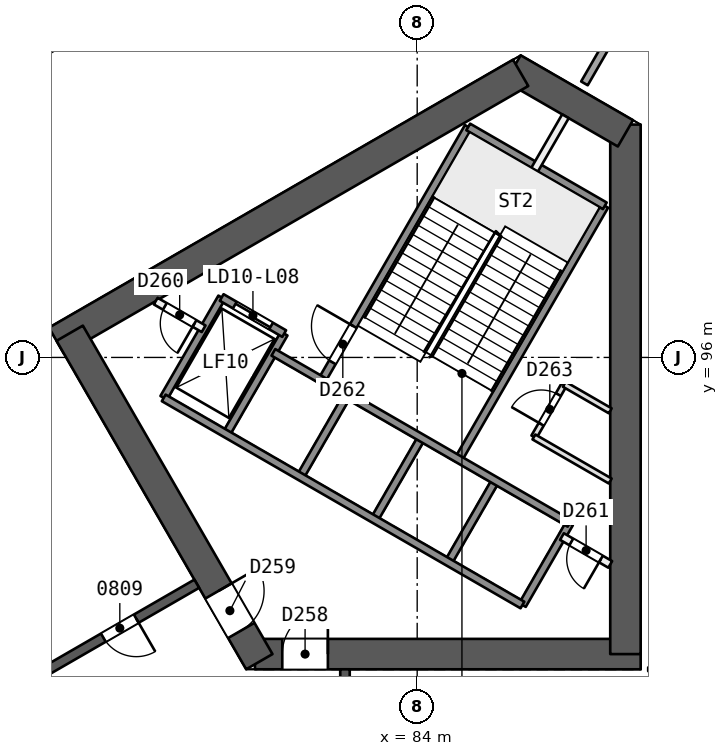
"""IFC4 building model, lengths in metres.
Left out: names, types, materials, properties, quantities, classifications, styles, units other than length and angle.
Written with IfcOpenShell. Run it as: python <this file> out.ifc"""

import sys

from ifc_helpers import new_model, si_unit, direction, frame, frame_2d, origin, place, context, subcontext, project, spatial, rectangle, extrude, element, fill, save


model = new_model("IFC4")
c1 = context("Model", 3, precision=1e-05, world=origin(), true_north=direction((0.0, 1.0)))
c2 = subcontext(c1, "Body", "Model", "MODEL_VIEW")
j1 = project(units=[si_unit("LENGTHUNIT", "METRE"), si_unit("PLANEANGLEUNIT", "RADIAN")], contexts=[c1])
p1 = place(None, origin())
s1 = spatial("IfcSite", under=j1, at=p1, CompositionType="ELEMENT")
p2 = place(p1, origin())
s2 = spatial("IfcBuilding", under=s1, at=p2, CompositionType="ELEMENT")
p3 = place(p2, frame((0.0, 0.0, 41.1)))
s3 = spatial("IfcBuildingStorey", under=s2, at=p3, CompositionType="ELEMENT", Elevation=41.1)
p4 = place(p3, frame((79.731, 88.194, 0.0), z_axis=(0.0, 0.0, 1.0), x_axis=(1.0, 0.0, 0.0)))
e1 = element("IfcWall", 1, at=p4, inside=s3, PredefinedType="SHEAR", context=c2, shape_type="SweptSolid", body=[
    extrude(rectangle(XDim=10.149, YDim=0.8, at=frame_2d((5.074, 0.0))), origin(), (0.0, 0.0, 1.0), 3.7),
])
p5 = place(p4, frame((0.719, 0.0, 0.0)))
e2 = element("IfcOpeningElement", 2, at=p5, cuts=e1, PredefinedType="OPENING", context=c2, shape_type="SweptSolid", body=[
    extrude(rectangle(XDim=1.2, YDim=2.1, at=frame_2d((0.6, 1.05))), frame((0.0, 0.411, 0.0), z_axis=(0.0, -1.0, 0.0), x_axis=(1.0, 0.0, 0.0)), (0.0, 0.0, 1.0), 0.821),
])
p6 = place(p3, frame((89.48, 88.194, 0.0), z_axis=(0.0, 0.0, 1.0), x_axis=(0.0, 1.0, 0.0)))
e3 = element("IfcWall", 3, at=p6, inside=s3, PredefinedType="SHEAR", context=c2, shape_type="SweptSolid", body=[
    extrude(rectangle(XDim=13.933, YDim=0.8, at=frame_2d((6.967, 0.0))), origin(), (0.0, 0.0, 1.0), 3.7),
])
p7 = place(p3, frame((89.48, 101.897, 0.0), z_axis=(0.0, 0.0, 1.0), x_axis=(-0.866034355626, 0.499984494636, 0.0)))
e4 = element("IfcWall", 4, at=p7, inside=s3, PredefinedType="SHEAR", context=c2, shape_type="SweptSolid", body=[
    extrude(rectangle(XDim=3.414, YDim=0.8, at=frame_2d((1.707, 0.0))), origin(), (0.0, 0.0, 1.0), 3.7),
])
p8 = place(p3, frame((86.723, 103.488, 0.0), z_axis=(0.0, 0.0, 1.0), x_axis=(-0.866032504327, -0.499987701298, 0.0)))
e5 = element("IfcWall", 5, at=p8, inside=s3, PredefinedType="SHEAR", context=c2, shape_type="SweptSolid", body=[
    extrude(rectangle(XDim=14.102, YDim=0.8, at=frame_2d((7.051, 0.0))), origin(), (0.0, 0.0, 1.0), 3.7),
])
p9 = place(p3, frame((74.856, 96.637, 0.0), z_axis=(0.0, 0.0, 1.0), x_axis=(0.499993500917, -0.866029155999, 0.0)))
e6 = element("IfcWall", 6, at=p9, inside=s3, PredefinedType="SHEAR", context=c2, shape_type="SweptSolid", body=[
    extrude(rectangle(XDim=9.98, YDim=0.8, at=frame_2d((4.99, 0.0))), origin(), (0.0, 0.0, 1.0), 3.7),
])
p10 = place(p9, frame((7.83, 0.0, 0.0)))
e7 = element("IfcOpeningElement", 7, at=p10, cuts=e6, PredefinedType="OPENING", context=c2, shape_type="SweptSolid", body=[
    extrude(rectangle(XDim=1.2, YDim=2.1, at=frame_2d((0.6, 1.05))), frame((0.0, 0.411, 0.0), z_axis=(0.0, -1.0, 0.0), x_axis=(1.0, 0.0, 0.0)), (0.0, 0.0, 1.0), 0.821),
])
p11 = place(p3, frame((82.1, 72.206, 0.0), z_axis=(0.0, 0.0, 1.0), x_axis=(0.0, 1.0, 0.0)))
e8 = element("IfcWall", 8, at=p11, inside=s3, PredefinedType="SHEAR", context=c2, shape_type="SweptSolid", body=[
    extrude(rectangle(XDim=15.588, YDim=0.25, at=frame_2d((7.794, 0.0))), origin(), (0.0, 0.0, 1.0), 3.2),
])
p12 = place(p11, frame((1.838, 0.0, 0.0)))
e9 = element("IfcOpeningElement", 9, at=p12, cuts=e8, PredefinedType="OPENING", context=c2, shape_type="SweptSolid", body=[
    extrude(rectangle(XDim=1.0, YDim=2.1, at=frame_2d((0.5, 1.05))), frame((0.0, 0.135, 0.0), z_axis=(0.0, -1.0, 0.0), x_axis=(1.0, 0.0, 0.0)), (0.0, 0.0, 1.0), 0.271),
])
p13 = place(p11, frame((8.383, 0.0, 0.0)))
e10 = element("IfcOpeningElement", 10, at=p13, cuts=e8, PredefinedType="OPENING", context=c2, shape_type="SweptSolid", body=[
    extrude(rectangle(XDim=1.1, YDim=2.1, at=frame_2d((0.55, 1.05))), frame((0.0, 0.135, 0.0), z_axis=(0.0, -1.0, 0.0), x_axis=(1.0, 0.0, 0.0)), (0.0, 0.0, 1.0), 0.271),
])
p14 = place(p11, frame((12.438, 0.0, 0.0)))
e11 = element("IfcOpeningElement", 11, at=p14, cuts=e8, PredefinedType="OPENING", context=c2, shape_type="SweptSolid", body=[
    extrude(rectangle(XDim=1.0, YDim=2.1, at=frame_2d((0.5, 1.05))), frame((0.0, 0.135, 0.0), z_axis=(0.0, -1.0, 0.0), x_axis=(1.0, 0.0, 0.0)), (0.0, 0.0, 1.0), 0.271),
])
p15 = place(p3, frame((78.2, 90.046, 0.0), z_axis=(0.0, 0.0, 1.0), x_axis=(-0.866026492143, -0.499998114903, 0.0)))
e12 = element("IfcWall", 12, at=p15, inside=s3, PredefinedType="SHEAR", context=c2, shape_type="SweptSolid", body=[
    extrude(rectangle(XDim=15.588, YDim=0.25, at=frame_2d((7.794, 0.0))), origin(), (0.0, 0.0, 1.0), 3.2),
])
p16 = place(p15, frame((1.838, 0.0, 0.0)))
e13 = element("IfcOpeningElement", 13, at=p16, cuts=e12, PredefinedType="OPENING", context=c2, shape_type="SweptSolid", body=[
    extrude(rectangle(XDim=1.0, YDim=2.1, at=frame_2d((0.5, 1.05))), frame((0.0, 0.135, 0.0), z_axis=(0.0, -1.0, 0.0), x_axis=(1.0, 0.0, 0.0)), (0.0, 0.0, 1.0), 0.271),
])
p17 = place(p15, frame((9.706, 0.0, 0.0)))
e14 = element("IfcOpeningElement", 14, at=p17, cuts=e12, PredefinedType="OPENING", context=c2, shape_type="SweptSolid", body=[
    extrude(rectangle(XDim=1.0, YDim=2.1, at=frame_2d((0.5, 1.05))), frame((0.0, 0.135, 0.0), z_axis=(0.0, -1.0, 0.0), x_axis=(1.0, 0.0, 0.0)), (0.0, 0.0, 1.0), 0.271),
])
p18 = place(p15, frame((12.962, 0.0, 0.0)))
e15 = element("IfcOpeningElement", 15, at=p18, cuts=e12, PredefinedType="OPENING", context=c2, shape_type="SweptSolid", body=[
    extrude(rectangle(XDim=1.2, YDim=2.4, at=frame_2d((0.6, 1.2))), frame((0.0, 0.135, 0.0), z_axis=(0.0, -1.0, 0.0), x_axis=(1.0, 0.0, 0.0)), (0.0, 0.0, 1.0), 0.271),
])
p19 = place(p3, frame((96.127, 87.794, 0.0), z_axis=(0.0, 0.0, 1.0), x_axis=(-1.0, 0.0, 0.0)))
e16 = element("IfcWall", 16, at=p19, inside=s3, PredefinedType="PARTITIONING", context=c2, shape_type="SweptSolid", body=[
    extrude(rectangle(XDim=6.048, YDim=0.1, at=frame_2d((3.024, 0.0))), origin(), (0.0, 0.0, 1.0), 3.2),
])
p20 = place(p19, frame((2.574, 0.0, 0.0)))
e17 = element("IfcOpeningElement", 17, at=p20, cuts=e16, PredefinedType="OPENING", context=c2, shape_type="SweptSolid", body=[
    extrude(rectangle(XDim=0.9, YDim=2.1, at=frame_2d((0.45, 1.05))), frame((0.0, 0.061, 0.0), z_axis=(0.0, -1.0, 0.0), x_axis=(1.0, 0.0, 0.0)), (0.0, 0.0, 1.0), 0.121),
])
p21 = place(p3, frame((93.49, 112.026, 0.0), z_axis=(0.0, 0.0, 1.0), x_axis=(-0.499993053251, -0.866029414455, 0.0)))
e18 = element("IfcWall", 18, at=p21, inside=s3, PredefinedType="PARTITIONING", context=c2, shape_type="SweptSolid", body=[
    extrude(rectangle(XDim=10.179, YDim=0.2, at=frame_2d((5.089, 0.0))), origin(), (0.0, 0.0, 1.0), 3.2),
])
p22 = place(p3, frame((37.87, 83.13, 0.0), z_axis=(0.0, 0.0, 1.0), x_axis=(0.866026630825, 0.499997874697, 0.0)))
e19 = element("IfcWall", 19, at=p22, inside=s3, PredefinedType="SOLIDWALL", context=c2, shape_type="SweptSolid", body=[
    extrude(rectangle(XDim=61.18, YDim=0.3, at=frame_2d((30.59, 0.0))), origin(), (0.0, 0.0, 1.0), 3.2),
])
p23 = place(p22, frame((12.181, 0.0, 0.0)))
e20 = element("IfcOpeningElement", 20, at=p23, cuts=e19, PredefinedType="OPENING", context=c2, shape_type="SweptSolid", body=[
    extrude(rectangle(XDim=2.4, YDim=2.4, at=frame_2d((1.2, 1.2))), frame((0.0, 0.161, 0.0), z_axis=(0.0, -1.0, 0.0), x_axis=(1.0, 0.0, 0.0)), (0.0, 0.0, 1.0), 0.321),
])
p24 = place(p22, frame((34.846, 0.0, 0.0)))
e21 = element("IfcOpeningElement", 21, at=p24, cuts=e19, PredefinedType="OPENING", context=c2, shape_type="SweptSolid", body=[
    extrude(rectangle(XDim=2.4, YDim=2.4, at=frame_2d((1.2, 1.2))), frame((0.0, 0.161, 0.0), z_axis=(0.0, -1.0, 0.0), x_axis=(1.0, 0.0, 0.0)), (0.0, 0.0, 1.0), 0.321),
])
p25 = place(p22, frame((47.439, 0.0, 0.0)))
e22 = element("IfcOpeningElement", 22, at=p25, cuts=e19, PredefinedType="OPENING", context=c2, shape_type="SweptSolid", body=[
    extrude(rectangle(XDim=2.4, YDim=2.4, at=frame_2d((1.2, 1.2))), frame((0.0, 0.161, 0.0), z_axis=(0.0, -1.0, 0.0), x_axis=(1.0, 0.0, 0.0)), (0.0, 0.0, 1.0), 0.321),
])
p26 = place(p22, frame((29.078, 0.0, 0.0)))
e23 = element("IfcOpeningElement", 23, at=p26, cuts=e19, PredefinedType="OPENING", context=c2, shape_type="SweptSolid", body=[
    extrude(rectangle(XDim=2.4, YDim=2.4, at=frame_2d((1.2, 1.2))), frame((0.0, 0.161, 0.0), z_axis=(0.0, -1.0, 0.0), x_axis=(1.0, 0.0, 0.0)), (0.0, 0.0, 1.0), 0.321),
])
p27 = place(p3, frame((86.77, 89.486, 0.0), z_axis=(0.0, 0.0, 1.0), x_axis=(0.499961042966, 0.86604789447, 0.0)))
e24 = element("IfcWall", 24, at=p27, inside=s3, PredefinedType="SOLIDWALL", context=c2, shape_type="SweptSolid", body=[
    extrude(rectangle(XDim=2.48, YDim=0.2, at=frame_2d((1.24, 0.0))), origin(), (0.0, 0.0, 1.0), 3.2),
])
p28 = place(p3, frame((87.071, 93.908, 0.0), z_axis=(0.0, 0.0, 1.0), x_axis=(0.499995408039, 0.866028054938, 0.0)))
e25 = element("IfcWall", 25, at=p28, inside=s3, PredefinedType="PARTITIONING", context=c2, shape_type="SweptSolid", body=[
    extrude(rectangle(XDim=1.6, YDim=0.15, at=frame_2d((0.8, 0.0))), origin(), (0.0, 0.0, 1.0), 3.2),
])
p29 = place(p28, frame((0.387, 0.0, 0.0)))
e26 = element("IfcOpeningElement", 26, at=p29, cuts=e25, PredefinedType="OPENING", context=c2, shape_type="SweptSolid", body=[
    extrude(rectangle(XDim=0.9, YDim=2.1, at=frame_2d((0.45, 1.05))), frame((0.0, 0.085, 0.0), z_axis=(0.0, -1.0, 0.0), x_axis=(1.0, 0.0, 0.0)), (0.0, 0.0, 1.0), 0.171),
])
p30 = place(p3, frame((84.821, 90.611, 0.0), z_axis=(0.0, 0.0, 1.0), x_axis=(0.499961042966, 0.86604789447, 0.0)))
e27 = element("IfcWall", 27, at=p30, inside=s3, PredefinedType="SOLIDWALL", context=c2, shape_type="SweptSolid", body=[
    extrude(rectangle(XDim=2.48, YDim=0.2, at=frame_2d((1.24, 0.0))), origin(), (0.0, 0.0, 1.0), 3.2),
])
p31 = place(p3, frame((85.087, 93.321, 0.0), z_axis=(0.0, 0.0, 1.0), x_axis=(0.500019787375, 0.866013979237, 0.0)))
e28 = element("IfcWall", 28, at=p31, inside=s3, PredefinedType="SOLIDWALL", context=c2, shape_type="SweptSolid", body=[
    extrude(rectangle(XDim=7.7, YDim=0.2, at=frame_2d((3.85, 0.0))), origin(), (0.0, 0.0, 1.0), 3.2),
])
p32 = place(p3, frame((82.873, 91.736, 0.0), z_axis=(0.0, 0.0, 1.0), x_axis=(0.499961042966, 0.86604789447, 0.0)))
e29 = element("IfcWall", 29, at=p32, inside=s3, PredefinedType="SOLIDWALL", context=c2, shape_type="SweptSolid", body=[
    extrude(rectangle(XDim=2.48, YDim=0.2, at=frame_2d((1.24, 0.0))), origin(), (0.0, 0.0, 1.0), 3.2),
])
p33 = place(p3, frame((87.09, 100.94, 0.0), z_axis=(0.0, 0.0, 1.0), x_axis=(0.499956811548, 0.866050337213, 0.0)))
e30 = element("IfcWall", 30, at=p33, inside=s3, PredefinedType="PARTITIONING", context=c2, shape_type="SweptSolid", body=[
    extrude(rectangle(XDim=1.623, YDim=0.2, at=frame_2d((0.812, 0.0))), origin(), (0.0, 0.0, 1.0), 3.2),
])
p34 = place(p3, frame((80.924, 92.861, 0.0), z_axis=(0.0, 0.0, 1.0), x_axis=(0.499961042966, 0.86604789447, 0.0)))
e31 = element("IfcWall", 31, at=p34, inside=s3, PredefinedType="SOLIDWALL", context=c2, shape_type="SweptSolid", body=[
    extrude(rectangle(XDim=2.48, YDim=0.2, at=frame_2d((1.24, 0.0))), origin(), (0.0, 0.0, 1.0), 3.2),
])
p35 = place(p3, frame((81.493, 95.396, 0.0), z_axis=(0.0, 0.0, 1.0), x_axis=(0.500006057782, 0.866021906294, 0.0)))
e32 = element("IfcWall", 32, at=p35, inside=s3, PredefinedType="SOLIDWALL", context=c2, shape_type="SweptSolid", body=[
    extrude(rectangle(XDim=7.7, YDim=0.2, at=frame_2d((3.85, 0.0))), origin(), (0.0, 0.0, 1.0), 3.2),
])
p36 = place(p35, frame((0.55, 0.0, 0.0)))
e33 = element("IfcOpeningElement", 33, at=p36, cuts=e32, PredefinedType="OPENING", context=c2, shape_type="SweptSolid", body=[
    extrude(rectangle(XDim=1.1, YDim=2.1, at=frame_2d((0.55, 1.05))), frame((0.0, 0.11, 0.0), z_axis=(0.0, -1.0, 0.0), x_axis=(1.0, 0.0, 0.0)), (0.0, 0.0, 1.0), 0.221),
])
for number, where, z_axis, x_axis in (
    (34, (78.976, 93.986, 0.0), (0.0, 0.0, 1.0), (0.5, 0.866, 0.0)),
    (35, (77.33, 94.936, 0.0), (0.0, 0.0, 1.0), (0.5, 0.866, 0.0)),
):
    element("IfcWall", number, at=place(p3, frame(where, z_axis=z_axis, x_axis=x_axis)), inside=s3, PredefinedType="SOLIDWALL", context=c2, shape_type="SweptSolid", body=[
        extrude(rectangle(XDim=3.05, YDim=0.2, at=frame_2d((1.525, 0.0))), origin(), (0.0, 0.0, 1.0), 3.2),
    ])
p37 = place(p3, frame((86.77, 89.486, 0.0), z_axis=(0.0, 0.0, 1.0), x_axis=(-0.86601811187, 0.500012629753, 0.0)))
e36 = element("IfcWall", 36, at=p37, inside=s3, PredefinedType="SOLIDWALL", context=c2, shape_type="SweptSolid", body=[
    extrude(rectangle(XDim=10.9, YDim=0.2, at=frame_2d((5.45, 0.0))), origin(), (0.0, 0.0, 1.0), 3.2),
])
p38 = place(p3, frame((89.08, 90.554, 0.0), z_axis=(0.0, 0.0, 1.0), x_axis=(-0.866022048785, 0.500005810984, 0.0)))
e37 = element("IfcWall", 37, at=p38, inside=s3, PredefinedType="PARTITIONING", context=c2, shape_type="SweptSolid", body=[
    extrude(rectangle(XDim=1.467, YDim=0.2, at=frame_2d((0.733, 0.0))), origin(), (0.0, 0.0, 1.0), 3.2),
])
p39 = place(p38, frame((0.283, 0.0, 0.0)))
e38 = element("IfcOpeningElement", 38, at=p39, cuts=e37, PredefinedType="OPENING", context=c2, shape_type="SweptSolid", body=[
    extrude(rectangle(XDim=0.9, YDim=2.1, at=frame_2d((0.45, 1.05))), frame((0.0, 0.11, 0.0), z_axis=(0.0, -1.0, 0.0), x_axis=(1.0, 0.0, 0.0)), (0.0, 0.0, 1.0), 0.221),
])
p40 = place(p3, frame((78.38, 96.755, 0.0), z_axis=(0.0, 0.0, 1.0), x_axis=(-0.866003949776, 0.500037157592, 0.0)))
e39 = element("IfcWall", 39, at=p40, inside=s3, PredefinedType="PARTITIONING", context=c2, shape_type="SweptSolid", body=[
    extrude(rectangle(XDim=1.455, YDim=0.2, at=frame_2d((0.728, 0.0))), origin(), (0.0, 0.0, 1.0), 3.2),
])
p41 = place(p40, frame((0.278, 0.0, 0.0)))
e40 = element("IfcOpeningElement", 40, at=p41, cuts=e39, PredefinedType="OPENING", context=c2, shape_type="SweptSolid", body=[
    extrude(rectangle(XDim=0.9, YDim=2.1, at=frame_2d((0.45, 1.05))), frame((0.0, 0.11, 0.0), z_axis=(0.0, -1.0, 0.0), x_axis=(1.0, 0.0, 0.0)), (0.0, 0.0, 1.0), 0.221),
])
p42 = place(p3, frame((88.01, 91.634, 0.0), z_axis=(0.0, 0.0, 1.0), x_axis=(-0.866024315419, 0.5000018851, 0.0)))
e41 = element("IfcWall", 41, at=p42, inside=s3, PredefinedType="SOLIDWALL", context=c2, shape_type="SweptSolid", body=[
    extrude(rectangle(XDim=9.0, YDim=0.2, at=frame_2d((4.5, 0.0))), origin(), (0.0, 0.0, 1.0), 3.2),
])
p43 = place(p3, frame((80.5, 96.627, 0.0), z_axis=(0.0, 0.0, 1.0), x_axis=(-0.86601224135, 0.500022797313, 0.0)))
e42 = element("IfcWall", 42, at=p43, inside=s3, PredefinedType="SOLIDWALL", context=c2, shape_type="SweptSolid", body=[
    extrude(rectangle(XDim=1.9, YDim=0.2, at=frame_2d((0.95, 0.0))), origin(), (0.0, 0.0, 1.0), 3.2),
])
p44 = place(p43, frame((0.4, 0.0, 0.0)))
e43 = element("IfcOpeningElement", 43, at=p44, cuts=e42, PredefinedType="OPENING", context=c2, shape_type="SweptSolid", body=[
    extrude(rectangle(XDim=1.1, YDim=2.1, at=frame_2d((0.55, 1.05))), frame((0.0, 0.11, 0.0), z_axis=(0.0, -1.0, 0.0), x_axis=(1.0, 0.0, 0.0)), (0.0, 0.0, 1.0), 0.221),
])
p45 = place(p3, frame((89.08, 92.748, 0.0), z_axis=(0.0, 0.0, 1.0), x_axis=(-0.866026103983, 0.499998787219, 0.0)))
e44 = element("IfcWall", 44, at=p45, inside=s3, PredefinedType="PARTITIONING", context=c2, shape_type="SweptSolid", body=[
    extrude(rectangle(XDim=2.32, YDim=0.15, at=frame_2d((1.16, 0.0))), origin(), (0.0, 0.0, 1.0), 3.2),
])
p46 = place(p3, frame((89.08, 94.595, 0.0), z_axis=(0.0, 0.0, 1.0), x_axis=(-0.866028321769, 0.499994945868, 0.0)))
e45 = element("IfcWall", 45, at=p46, inside=s3, PredefinedType="PARTITIONING", context=c2, shape_type="SweptSolid", body=[
    extrude(rectangle(XDim=1.396, YDim=0.15, at=frame_2d((0.698, 0.0))), origin(), (0.0, 0.0, 1.0), 3.2),
])
p47 = place(p3, frame((88.937, 99.99, 0.0), z_axis=(0.0, 0.0, 1.0), x_axis=(-0.866004344652, 0.500036473714, 0.0)))
e46 = element("IfcWall", 46, at=p47, inside=s3, PredefinedType="SOLIDWALL", context=c2, shape_type="SweptSolid", body=[
    extrude(rectangle(XDim=4.15, YDim=0.2, at=frame_2d((2.075, 0.0))), origin(), (0.0, 0.0, 1.0), 3.2),
])
p48 = place(p16, origin())
e47 = element("IfcDoor", 47, at=p48, inside=s3, OperationType="SINGLE_SWING_LEFT", PredefinedType="NOTDEFINED", context=c2, shape_type="SweptSolid", body=[
    extrude(rectangle(XDim=1.0, YDim=2.1, at=frame_2d((0.5, 1.05))), frame((0.0, 0.025, 0.0), z_axis=(0.0, -1.0, 0.0), x_axis=(1.0, 0.0, 0.0)), (0.0, 0.0, 1.0), 0.05),
])
fill(e13, e47)
p49 = place(p5, origin())
e48 = element("IfcDoor", 48, at=p49, inside=s3, OperationType="SINGLE_SWING_RIGHT", PredefinedType="NOTDEFINED", context=c2, shape_type="SweptSolid", body=[
    extrude(rectangle(XDim=1.2, YDim=2.1, at=frame_2d((0.6, 1.05))), frame((0.0, 0.025, 0.0), z_axis=(0.0, -1.0, 0.0), x_axis=(1.0, 0.0, 0.0)), (0.0, 0.0, 1.0), 0.05),
])
fill(e2, e48)
p50 = place(p10, origin())
e49 = element("IfcDoor", 49, at=p50, inside=s3, OperationType="SINGLE_SWING_LEFT", PredefinedType="NOTDEFINED", context=c2, shape_type="SweptSolid", body=[
    extrude(rectangle(XDim=1.2, YDim=2.1, at=frame_2d((0.6, 1.05))), frame((0.0, 0.025, 0.0), z_axis=(0.0, -1.0, 0.0), x_axis=(1.0, 0.0, 0.0)), (0.0, 0.0, 1.0), 0.05),
])
fill(e7, e49)
p51 = place(p44, origin())
e50 = element("IfcDoor", 50, at=p51, inside=s3, OperationType="SLIDING_TO_RIGHT", PredefinedType="NOTDEFINED", context=c2, shape_type="SweptSolid", body=[
    extrude(rectangle(XDim=1.1, YDim=2.1, at=frame_2d((0.55, 1.05))), frame((0.0, 0.025, 0.0), z_axis=(0.0, -1.0, 0.0), x_axis=(1.0, 0.0, 0.0)), (0.0, 0.0, 1.0), 0.05),
])
fill(e43, e50)
p52 = place(p41, origin())
e51 = element("IfcDoor", 51, at=p52, inside=s3, OperationType="SINGLE_SWING_LEFT", PredefinedType="NOTDEFINED", context=c2, shape_type="SweptSolid", body=[
    extrude(rectangle(XDim=0.9, YDim=2.1, at=frame_2d((0.45, 1.05))), frame((0.0, 0.025, 0.0), z_axis=(0.0, -1.0, 0.0), x_axis=(1.0, 0.0, 0.0)), (0.0, 0.0, 1.0), 0.05),
])
fill(e40, e51)
p53 = place(p39, origin())
e52 = element("IfcDoor", 52, at=p53, inside=s3, OperationType="SINGLE_SWING_LEFT", PredefinedType="NOTDEFINED", context=c2, shape_type="SweptSolid", body=[
    extrude(rectangle(XDim=0.9, YDim=2.1, at=frame_2d((0.45, 1.05))), frame((0.0, 0.025, 0.0), z_axis=(0.0, -1.0, 0.0), x_axis=(1.0, 0.0, 0.0)), (0.0, 0.0, 1.0), 0.05),
])
fill(e38, e52)
p54 = place(p36, origin())
e53 = element("IfcDoor", 53, at=p54, inside=s3, OperationType="SINGLE_SWING_RIGHT", PredefinedType="NOTDEFINED", context=c2, shape_type="SweptSolid", body=[
    extrude(rectangle(XDim=1.1, YDim=2.1, at=frame_2d((0.55, 1.05))), frame((0.0, 0.025, 0.0), z_axis=(0.0, -1.0, 0.0), x_axis=(1.0, 0.0, 0.0)), (0.0, 0.0, 1.0), 0.05),
])
fill(e33, e53)
p55 = place(p29, origin())
e54 = element("IfcDoor", 54, at=p55, inside=s3, OperationType="SINGLE_SWING_LEFT", PredefinedType="NOTDEFINED", context=c2, shape_type="SweptSolid", body=[
    extrude(rectangle(XDim=0.9, YDim=2.1, at=frame_2d((0.45, 1.05))), frame((0.0, 0.025, 0.0), z_axis=(0.0, -1.0, 0.0), x_axis=(1.0, 0.0, 0.0)), (0.0, 0.0, 1.0), 0.05),
])
fill(e26, e54)
save(model, sys.argv[1])
